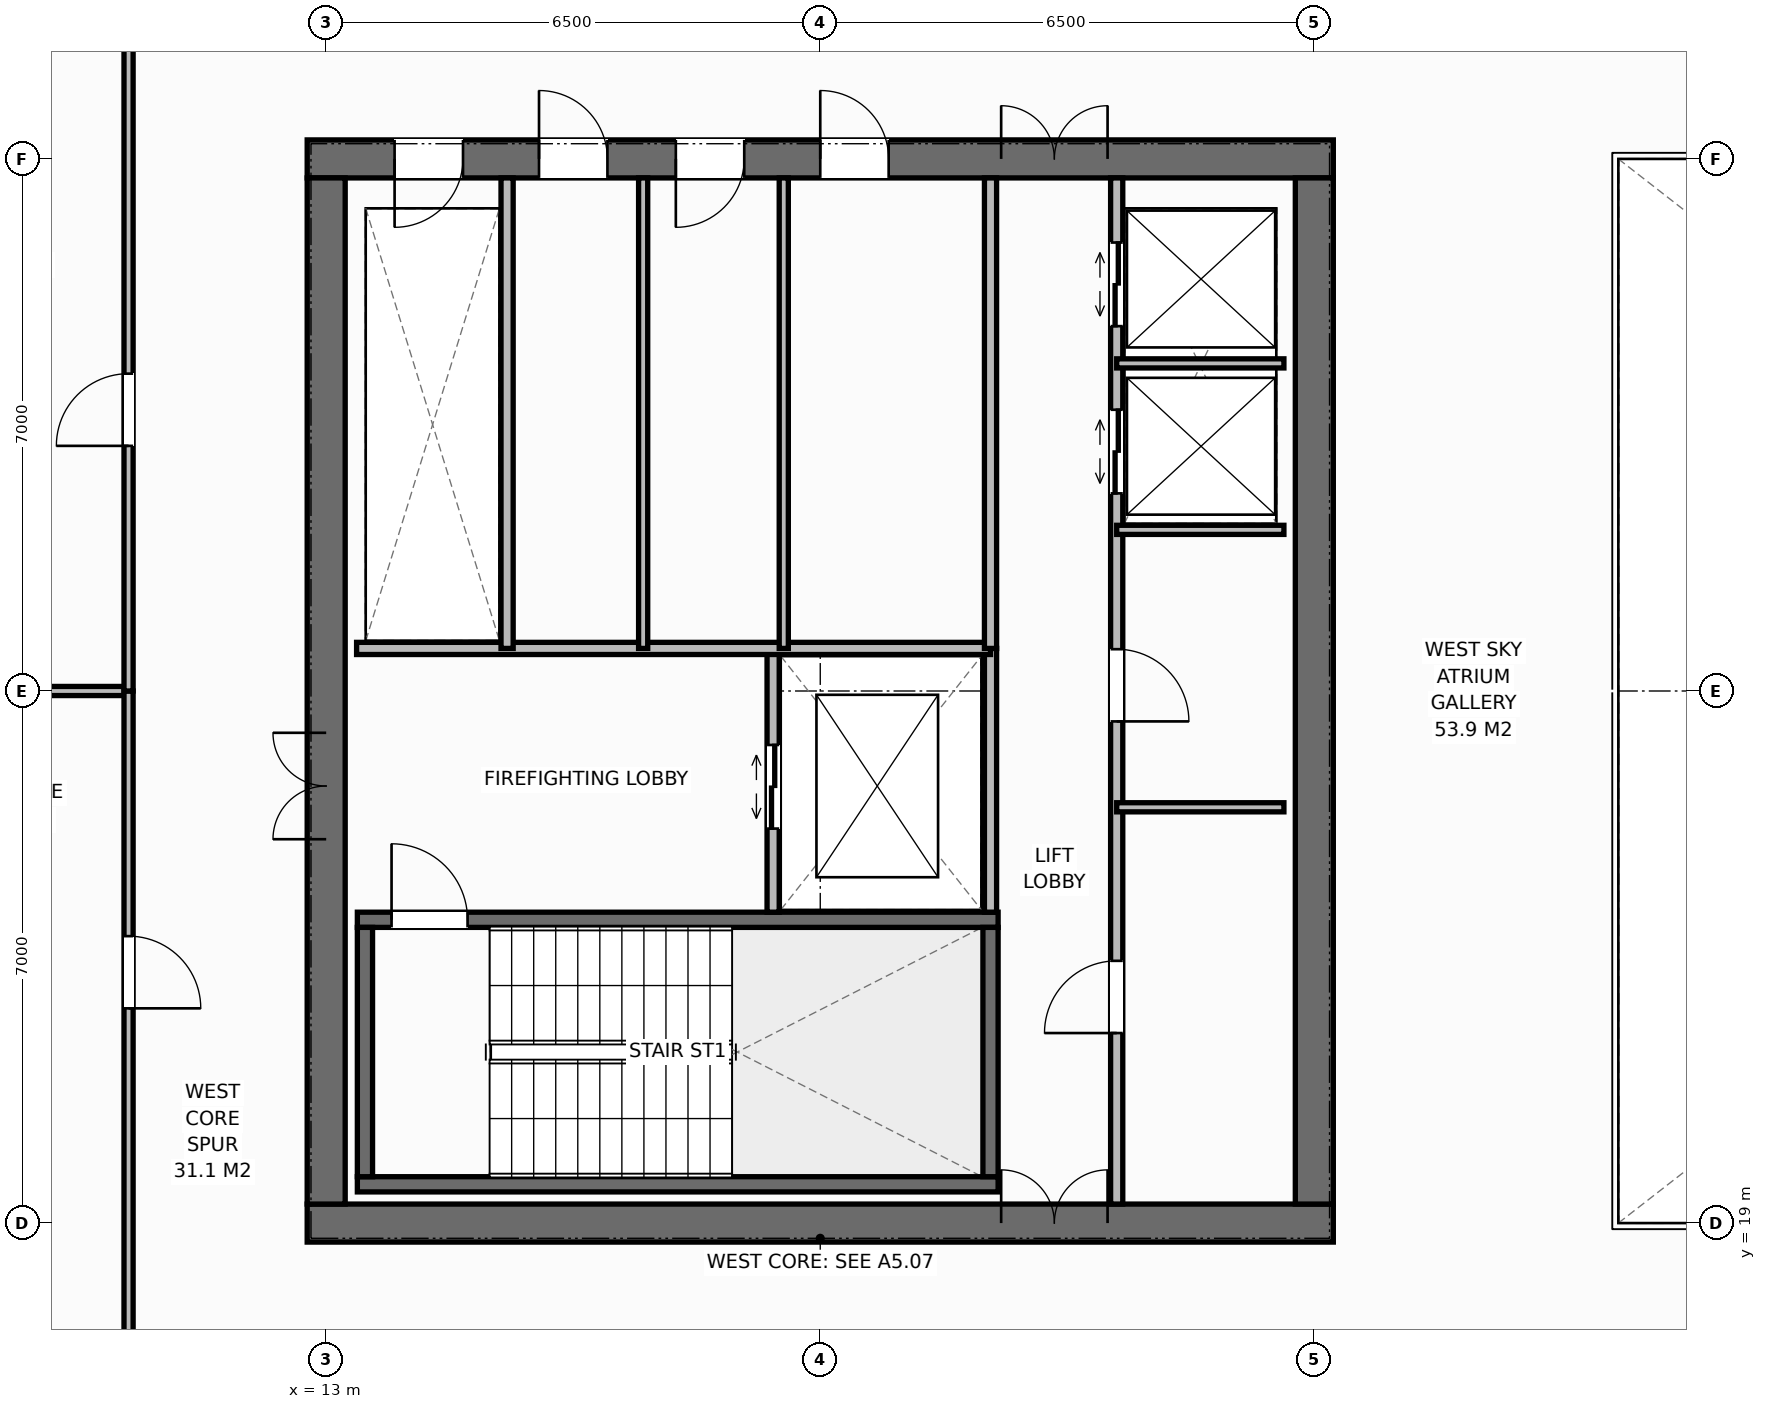
"""IFC4 building model, lengths in metres.
Left out: names, types, materials, properties, quantities, classifications, styles, units other than length and angle.
Written with IfcOpenShell. Run it as: python <this file> out.ifc"""

import sys

from ifc_helpers import new_model, si_unit, direction, frame, frame_2d, origin, place, context, subcontext, project, spatial, rectangle, extrude, element, fill, save


model = new_model("IFC4")
c1 = context("Model", 3, precision=1e-05, world=origin(), true_north=direction((0.0, 1.0)))
c2 = subcontext(c1, "Body", "Model", "MODEL_VIEW")
j1 = project(units=[si_unit("LENGTHUNIT", "METRE"), si_unit("PLANEANGLEUNIT", "RADIAN")], contexts=[c1])
p1 = place(None, origin())
s1 = spatial("IfcSite", under=j1, at=p1, CompositionType="ELEMENT")
p2 = place(p1, origin())
s2 = spatial("IfcBuilding", under=s1, at=p2, CompositionType="ELEMENT")
p3 = place(p2, frame((0.0, 0.0, 282.4)))
s3 = spatial("IfcBuildingStorey", under=s2, at=p3, CompositionType="ELEMENT", Elevation=282.4)
p4 = place(p3, frame((12.75, 19.0, 0.0), z_axis=(0.0, 0.0, 1.0), x_axis=(1.0, 0.0, 0.0)))
e1 = element("IfcWall", 1, at=p4, inside=s3, PredefinedType="SHEAR", context=c2, shape_type="SweptSolid", body=[
    extrude(rectangle(XDim=13.5, YDim=0.5, at=frame_2d((6.75, 0.0))), origin(), (0.0, 0.0, 1.0), 4.0),
])
p5 = place(p4, frame((9.13, 0.0, 0.0)))
e2 = element("IfcOpeningElement", 2, at=p5, cuts=e1, PredefinedType="OPENING", context=c2, shape_type="SweptSolid", body=[
    extrude(rectangle(XDim=1.4, YDim=2.2, at=frame_2d((0.7, 1.1))), frame((0.0, 0.26, 0.0), z_axis=(0.0, -1.0, 0.0), x_axis=(1.0, 0.0, 0.0)), (0.0, 0.0, 1.0), 0.52),
])
p6 = place(p3, frame((12.75, 33.0, 0.0), z_axis=(0.0, 0.0, 1.0), x_axis=(1.0, 0.0, 0.0)))
e3 = element("IfcWall", 3, at=p6, inside=s3, PredefinedType="SHEAR", context=c2, shape_type="SweptSolid", body=[
    extrude(rectangle(XDim=13.5, YDim=0.5, at=frame_2d((6.75, 0.0))), origin(), (0.0, 0.0, 1.0), 4.0),
])
p7 = place(p6, frame((1.15, 0.0, 0.0)))
e4 = element("IfcOpeningElement", 4, at=p7, cuts=e3, PredefinedType="OPENING", context=c2, shape_type="SweptSolid", body=[
    extrude(rectangle(XDim=0.9, YDim=2.15, at=frame_2d((0.45, 1.075))), frame((0.0, 0.26, 0.0), z_axis=(0.0, -1.0, 0.0), x_axis=(1.0, 0.0, 0.0)), (0.0, 0.0, 1.0), 0.52),
])
p8 = place(p6, frame((3.05, 0.0, 0.0)))
e5 = element("IfcOpeningElement", 5, at=p8, cuts=e3, PredefinedType="OPENING", context=c2, shape_type="SweptSolid", body=[
    extrude(rectangle(XDim=0.9, YDim=2.15, at=frame_2d((0.45, 1.075))), frame((0.0, 0.26, 0.0), z_axis=(0.0, -1.0, 0.0), x_axis=(1.0, 0.0, 0.0)), (0.0, 0.0, 1.0), 0.52),
])
p9 = place(p6, frame((4.85, 0.0, 0.0)))
e6 = element("IfcOpeningElement", 6, at=p9, cuts=e3, PredefinedType="OPENING", context=c2, shape_type="SweptSolid", body=[
    extrude(rectangle(XDim=0.9, YDim=2.15, at=frame_2d((0.45, 1.075))), frame((0.0, 0.26, 0.0), z_axis=(0.0, -1.0, 0.0), x_axis=(1.0, 0.0, 0.0)), (0.0, 0.0, 1.0), 0.52),
])
p10 = place(p6, frame((6.75, 0.0, 0.0)))
e7 = element("IfcOpeningElement", 7, at=p10, cuts=e3, PredefinedType="OPENING", context=c2, shape_type="SweptSolid", body=[
    extrude(rectangle(XDim=0.9, YDim=2.15, at=frame_2d((0.45, 1.075))), frame((0.0, 0.26, 0.0), z_axis=(0.0, -1.0, 0.0), x_axis=(1.0, 0.0, 0.0)), (0.0, 0.0, 1.0), 0.52),
])
p11 = place(p6, frame((9.13, 0.0, 0.0)))
e8 = element("IfcOpeningElement", 8, at=p11, cuts=e3, PredefinedType="OPENING", context=c2, shape_type="SweptSolid", body=[
    extrude(rectangle(XDim=1.4, YDim=2.2, at=frame_2d((0.7, 1.1))), frame((0.0, 0.26, 0.0), z_axis=(0.0, -1.0, 0.0), x_axis=(1.0, 0.0, 0.0)), (0.0, 0.0, 1.0), 0.52),
])
p12 = place(p3, frame((13.0, 19.25, 0.0), z_axis=(0.0, 0.0, 1.0), x_axis=(0.0, 1.0, 0.0)))
e9 = element("IfcWall", 9, at=p12, inside=s3, PredefinedType="SHEAR", context=c2, shape_type="SweptSolid", body=[
    extrude(rectangle(XDim=13.5, YDim=0.5, at=frame_2d((6.75, 0.0))), origin(), (0.0, 0.0, 1.0), 4.0),
])
p13 = place(p12, frame((4.8, 0.0, 0.0)))
e10 = element("IfcOpeningElement", 10, at=p13, cuts=e9, PredefinedType="OPENING", context=c2, shape_type="SweptSolid", body=[
    extrude(rectangle(XDim=1.4, YDim=2.2, at=frame_2d((0.7, 1.1))), frame((0.0, 0.26, 0.0), z_axis=(0.0, -1.0, 0.0), x_axis=(1.0, 0.0, 0.0)), (0.0, 0.0, 1.0), 0.52),
])
p14 = place(p3, frame((26.0, 19.25, 0.0), z_axis=(0.0, 0.0, 1.0), x_axis=(0.0, 1.0, 0.0)))
e11 = element("IfcWall", 11, at=p14, inside=s3, PredefinedType="SHEAR", context=c2, shape_type="SweptSolid", body=[
    extrude(rectangle(XDim=13.5, YDim=0.5, at=frame_2d((6.75, 0.0))), origin(), (0.0, 0.0, 1.0), 4.0),
])
p15 = place(p3, frame((13.41, 19.51, 0.0), z_axis=(0.0, 0.0, 1.0), x_axis=(1.0, 0.0, 0.0)))
e12 = element("IfcWall", 12, at=p15, inside=s3, PredefinedType="SHEAR", context=c2, shape_type="SweptSolid", body=[
    extrude(rectangle(XDim=8.43, YDim=0.2, at=frame_2d((4.215, 0.0))), origin(), (0.0, 0.0, 1.0), 4.0),
])
p16 = place(p3, frame((13.41, 22.99, 0.0), z_axis=(0.0, 0.0, 1.0), x_axis=(1.0, 0.0, 0.0)))
e13 = element("IfcWall", 13, at=p16, inside=s3, PredefinedType="SHEAR", context=c2, shape_type="SweptSolid", body=[
    extrude(rectangle(XDim=8.43, YDim=0.2, at=frame_2d((4.215, 0.0))), origin(), (0.0, 0.0, 1.0), 4.0),
])
p17 = place(p16, frame((0.45, 0.0, 0.0)))
e14 = element("IfcOpeningElement", 14, at=p17, cuts=e13, PredefinedType="OPENING", context=c2, shape_type="SweptSolid", body=[
    extrude(rectangle(XDim=1.0, YDim=2.15, at=frame_2d((0.5, 1.075))), frame((0.0, 0.11, 0.0), z_axis=(0.0, -1.0, 0.0), x_axis=(1.0, 0.0, 0.0)), (0.0, 0.0, 1.0), 0.22),
])
for number, where, z_axis, x_axis in (
    (15, (13.51, 19.61, 0.0), (0.0, 0.0, 1.0), (0.0, 1.0, 0.0)),
    (16, (21.74, 19.61, 0.0), (0.0, 0.0, 1.0), (0.0, 1.0, 0.0)),
):
    element("IfcWall", number, at=place(p3, frame(where, z_axis=z_axis, x_axis=x_axis)), inside=s3, PredefinedType="SHEAR", context=c2, shape_type="SweptSolid", body=[
        extrude(rectangle(XDim=3.28, YDim=0.2, at=frame_2d((1.64, 0.0))), origin(), (0.0, 0.0, 1.0), 4.0),
    ])
p18 = place(p3, frame((21.74, 23.09, 0.0), z_axis=(0.0, 0.0, 1.0), x_axis=(0.0, 1.0, 0.0)))
e17 = element("IfcWall", 17, at=p18, inside=s3, PredefinedType="STANDARD", context=c2, shape_type="SweptSolid", body=[
    extrude(rectangle(XDim=3.47, YDim=0.16, at=frame_2d((1.735, 0.0))), origin(), (0.0, 0.0, 1.0), 3.788),
])
p19 = place(p3, frame((18.88, 23.09, 0.0), z_axis=(0.0, 0.0, 1.0), x_axis=(0.0, 1.0, 0.0)))
e18 = element("IfcWall", 18, at=p19, inside=s3, PredefinedType="STANDARD", context=c2, shape_type="SweptSolid", body=[
    extrude(rectangle(XDim=3.47, YDim=0.16, at=frame_2d((1.735, 0.0))), origin(), (0.0, 0.0, 1.0), 3.788),
])
p20 = place(p19, frame((1.1, 0.0, 0.0)))
e19 = element("IfcOpeningElement", 19, at=p20, cuts=e18, PredefinedType="OPENING", context=c2, shape_type="SweptSolid", body=[
    extrude(rectangle(XDim=1.1, YDim=2.2, at=frame_2d((0.55, 1.1))), frame((0.0, 0.09, 0.0), z_axis=(0.0, -1.0, 0.0), x_axis=(1.0, 0.0, 0.0)), (0.0, 0.0, 1.0), 0.18),
])
p21 = place(p3, frame((13.4, 26.56, 0.0), z_axis=(0.0, 0.0, 1.0), x_axis=(1.0, 0.0, 0.0)))
e20 = element("IfcWall", 20, at=p21, inside=s3, PredefinedType="STANDARD", context=c2, shape_type="SweptSolid", body=[
    extrude(rectangle(XDim=8.34, YDim=0.16, at=frame_2d((4.17, 0.0))), origin(), (0.0, 0.0, 1.0), 3.788),
])
p22 = place(p3, frame((15.38, 26.56, 0.0), z_axis=(0.0, 0.0, 1.0), x_axis=(0.0, 1.0, 0.0)))
e21 = element("IfcWall", 21, at=p22, inside=s3, PredefinedType="STANDARD", context=c2, shape_type="SweptSolid", body=[
    extrude(rectangle(XDim=6.19, YDim=0.16, at=frame_2d((3.095, 0.0))), origin(), (0.0, 0.0, 1.0), 3.788),
])
for number, where, z_axis, x_axis in (
    (22, (17.17, 26.56, 0.0), (0.0, 0.0, 1.0), (0.0, 1.0, 0.0)),
    (23, (19.02, 26.56, 0.0), (0.0, 0.0, 1.0), (0.0, 1.0, 0.0)),
):
    element("IfcWall", number, at=place(p3, frame(where, z_axis=z_axis, x_axis=x_axis)), inside=s3, PredefinedType="PARTITIONING", context=c2, shape_type="SweptSolid", body=[
        extrude(rectangle(XDim=6.19, YDim=0.12, at=frame_2d((3.095, 0.0))), origin(), (0.0, 0.0, 1.0), 3.788),
    ])
p23 = place(p3, frame((21.74, 26.56, 0.0), z_axis=(0.0, 0.0, 1.0), x_axis=(0.0, 1.0, 0.0)))
e24 = element("IfcWall", 24, at=p23, inside=s3, PredefinedType="STANDARD", context=c2, shape_type="SweptSolid", body=[
    extrude(rectangle(XDim=6.19, YDim=0.16, at=frame_2d((3.095, 0.0))), origin(), (0.0, 0.0, 1.0), 3.788),
])
p24 = place(p3, frame((23.4, 19.25, 0.0), z_axis=(0.0, 0.0, 1.0), x_axis=(0.0, 1.0, 0.0)))
e25 = element("IfcWall", 25, at=p24, inside=s3, PredefinedType="STANDARD", context=c2, shape_type="SweptSolid", body=[
    extrude(rectangle(XDim=13.5, YDim=0.16, at=frame_2d((6.75, 0.0))), origin(), (0.0, 0.0, 1.0), 3.788),
])
p25 = place(p24, frame((2.25, 0.0, 0.0)))
e26 = element("IfcOpeningElement", 26, at=p25, cuts=e25, PredefinedType="OPENING", context=c2, shape_type="SweptSolid", body=[
    extrude(rectangle(XDim=0.95, YDim=2.15, at=frame_2d((0.475, 1.075))), frame((0.0, 0.09, 0.0), z_axis=(0.0, -1.0, 0.0), x_axis=(1.0, 0.0, 0.0)), (0.0, 0.0, 1.0), 0.18),
])
p26 = place(p24, frame((6.35, 0.0, 0.0)))
e27 = element("IfcOpeningElement", 27, at=p26, cuts=e25, PredefinedType="OPENING", context=c2, shape_type="SweptSolid", body=[
    extrude(rectangle(XDim=0.95, YDim=2.15, at=frame_2d((0.475, 1.075))), frame((0.0, 0.09, 0.0), z_axis=(0.0, -1.0, 0.0), x_axis=(1.0, 0.0, 0.0)), (0.0, 0.0, 1.0), 0.18),
])
p27 = place(p24, frame((9.35, 0.0, 0.0)))
e28 = element("IfcOpeningElement", 28, at=p27, cuts=e25, PredefinedType="OPENING", context=c2, shape_type="SweptSolid", body=[
    extrude(rectangle(XDim=1.1, YDim=2.2, at=frame_2d((0.55, 1.1))), frame((0.0, 0.09, 0.0), z_axis=(0.0, -1.0, 0.0), x_axis=(1.0, 0.0, 0.0)), (0.0, 0.0, 1.0), 0.18),
])
p28 = place(p24, frame((11.55, 0.0, 0.0)))
e29 = element("IfcOpeningElement", 29, at=p28, cuts=e25, PredefinedType="OPENING", context=c2, shape_type="SweptSolid", body=[
    extrude(rectangle(XDim=1.1, YDim=2.2, at=frame_2d((0.55, 1.1))), frame((0.0, 0.09, 0.0), z_axis=(0.0, -1.0, 0.0), x_axis=(1.0, 0.0, 0.0)), (0.0, 0.0, 1.0), 0.18),
])
for number, where, z_axis, x_axis in (
    (30, (23.4, 24.47, 0.0), (0.0, 0.0, 1.0), (1.0, 0.0, 0.0)),
    (31, (23.4, 28.12, 0.0), (0.0, 0.0, 1.0), (1.0, 0.0, 0.0)),
    (32, (23.4, 30.31, 0.0), (0.0, 0.0, 1.0), (1.0, 0.0, 0.0)),
):
    element("IfcWall", number, at=place(p3, frame(where, z_axis=z_axis, x_axis=x_axis)), inside=s3, PredefinedType="PARTITIONING", context=c2, shape_type="SweptSolid", body=[
        extrude(rectangle(XDim=2.2, YDim=0.12, at=frame_2d((1.1, 0.0))), origin(), (0.0, 0.0, 1.0), 3.788),
    ])
p29 = place(p3, frame((7.22, 26.0, 0.0), z_axis=(0.0, 0.0, 1.0), x_axis=(1.0, 0.0, 0.0)))
e33 = element("IfcWall", 33, at=p29, inside=s3, PredefinedType="PARTITIONING", context=c2, shape_type="SweptSolid", body=[
    extrude(rectangle(XDim=3.18, YDim=0.12, at=frame_2d((1.59, 0.0))), origin(), (0.0, 0.0, 1.0), 3.788),
])
p30 = place(p3, frame((10.4, 16.5, 0.0), z_axis=(0.0, 0.0, 1.0), x_axis=(0.0, 1.0, 0.0)))
e34 = element("IfcWall", 34, at=p30, inside=s3, PredefinedType="PARTITIONING", context=c2, shape_type="SweptSolid", body=[
    extrude(rectangle(XDim=9.5, YDim=0.12, at=frame_2d((4.75, 0.0))), origin(), (0.0, 0.0, 1.0), 3.788),
])
p31 = place(p30, frame((5.325, 0.0, 0.0)))
e35 = element("IfcOpeningElement", 35, at=p31, cuts=e34, PredefinedType="OPENING", context=c2, shape_type="SweptSolid", body=[
    extrude(rectangle(XDim=0.95, YDim=2.15, at=frame_2d((0.475, 1.075))), frame((0.0, 0.07, 0.0), z_axis=(0.0, -1.0, 0.0), x_axis=(1.0, 0.0, 0.0)), (0.0, 0.0, 1.0), 0.14),
])
p32 = place(p3, frame((10.4, 26.0, 0.0), z_axis=(0.0, 0.0, 1.0), x_axis=(0.0, 1.0, 0.0)))
e36 = element("IfcWall", 36, at=p32, inside=s3, PredefinedType="PARTITIONING", context=c2, shape_type="SweptSolid", body=[
    extrude(rectangle(XDim=9.5, YDim=0.12, at=frame_2d((4.75, 0.0))), origin(), (0.0, 0.0, 1.0), 3.788),
])
p33 = place(p32, frame((3.225, 0.0, 0.0)))
e37 = element("IfcOpeningElement", 37, at=p33, cuts=e36, PredefinedType="OPENING", context=c2, shape_type="SweptSolid", body=[
    extrude(rectangle(XDim=0.95, YDim=2.15, at=frame_2d((0.475, 1.075))), frame((0.0, 0.07, 0.0), z_axis=(0.0, -1.0, 0.0), x_axis=(1.0, 0.0, 0.0)), (0.0, 0.0, 1.0), 0.14),
])
p34 = place(p17, origin())
e38 = element("IfcDoor", 38, at=p34, inside=s3, OperationType="SINGLE_SWING_LEFT", PredefinedType="DOOR", context=c2, shape_type="SweptSolid", body=[
    extrude(rectangle(XDim=1.0, YDim=2.15, at=frame_2d((0.5, 1.075))), frame((0.0, 0.025, 0.0), z_axis=(0.0, -1.0, 0.0), x_axis=(1.0, 0.0, 0.0)), (0.0, 0.0, 1.0), 0.05),
])
fill(e14, e38)
p35 = place(p13, origin())
e39 = element("IfcDoor", 39, at=p35, inside=s3, OperationType="DOUBLE_DOOR_SINGLE_SWING", PredefinedType="DOOR", context=c2, shape_type="SweptSolid", body=[
    extrude(rectangle(XDim=1.4, YDim=2.2, at=frame_2d((0.7, 1.1))), frame((0.0, 0.025, 0.0), z_axis=(0.0, -1.0, 0.0), x_axis=(1.0, 0.0, 0.0)), (0.0, 0.0, 1.0), 0.05),
])
fill(e10, e39)
p36 = place(p20, origin())
e40 = element("IfcDoor", 40, at=p36, inside=s3, OperationType="DOUBLE_DOOR_SLIDING", PredefinedType="DOOR", context=c2, shape_type="SweptSolid", body=[
    extrude(rectangle(XDim=1.1, YDim=2.2, at=frame_2d((0.55, 1.1))), frame((0.0, 0.025, 0.0), z_axis=(0.0, -1.0, 0.0), x_axis=(1.0, 0.0, 0.0)), (0.0, 0.0, 1.0), 0.05),
])
fill(e19, e40)
p37 = place(p7, origin())
e41 = element("IfcDoor", 41, at=p37, inside=s3, OperationType="SINGLE_SWING_RIGHT", PredefinedType="DOOR", context=c2, shape_type="SweptSolid", body=[
    extrude(rectangle(XDim=0.9, YDim=2.15, at=frame_2d((0.45, 1.075))), frame((0.0, -0.025, 0.0), z_axis=(0.0, -1.0, 0.0), x_axis=(1.0, 0.0, 0.0)), (0.0, 0.0, 1.0), 0.05),
])
fill(e4, e41)
p38 = place(p8, origin())
e42 = element("IfcDoor", 42, at=p38, inside=s3, OperationType="SINGLE_SWING_LEFT", PredefinedType="DOOR", context=c2, shape_type="SweptSolid", body=[
    extrude(rectangle(XDim=0.9, YDim=2.15, at=frame_2d((0.45, 1.075))), frame((0.0, -0.025, 0.0), z_axis=(0.0, -1.0, 0.0), x_axis=(1.0, 0.0, 0.0)), (0.0, 0.0, 1.0), 0.05),
])
fill(e5, e42)
p39 = place(p9, origin())
e43 = element("IfcDoor", 43, at=p39, inside=s3, OperationType="SINGLE_SWING_RIGHT", PredefinedType="DOOR", context=c2, shape_type="SweptSolid", body=[
    extrude(rectangle(XDim=0.9, YDim=2.15, at=frame_2d((0.45, 1.075))), frame((0.0, -0.025, 0.0), z_axis=(0.0, -1.0, 0.0), x_axis=(1.0, 0.0, 0.0)), (0.0, 0.0, 1.0), 0.05),
])
fill(e6, e43)
p40 = place(p10, origin())
e44 = element("IfcDoor", 44, at=p40, inside=s3, OperationType="SINGLE_SWING_LEFT", PredefinedType="DOOR", context=c2, shape_type="SweptSolid", body=[
    extrude(rectangle(XDim=0.9, YDim=2.15, at=frame_2d((0.45, 1.075))), frame((0.0, -0.025, 0.0), z_axis=(0.0, -1.0, 0.0), x_axis=(1.0, 0.0, 0.0)), (0.0, 0.0, 1.0), 0.05),
])
fill(e7, e44)
p41 = place(p5, origin())
e45 = element("IfcDoor", 45, at=p41, inside=s3, OperationType="DOUBLE_DOOR_SINGLE_SWING", PredefinedType="DOOR", context=c2, shape_type="SweptSolid", body=[
    extrude(rectangle(XDim=1.4, YDim=2.2, at=frame_2d((0.7, 1.1))), frame((0.0, 0.075, 0.0), z_axis=(0.0, -1.0, 0.0), x_axis=(1.0, 0.0, 0.0)), (0.0, 0.0, 1.0), 0.05),
])
fill(e2, e45)
p42 = place(p11, origin())
e46 = element("IfcDoor", 46, at=p42, inside=s3, OperationType="DOUBLE_DOOR_SINGLE_SWING", PredefinedType="DOOR", context=c2, shape_type="SweptSolid", body=[
    extrude(rectangle(XDim=1.4, YDim=2.2, at=frame_2d((0.7, 1.1))), frame((0.0, -0.025, 0.0), z_axis=(0.0, -1.0, 0.0), x_axis=(1.0, 0.0, 0.0)), (0.0, 0.0, 1.0), 0.05),
])
fill(e8, e46)
p43 = place(p25, origin())
e47 = element("IfcDoor", 47, at=p43, inside=s3, OperationType="SINGLE_SWING_LEFT", PredefinedType="DOOR", context=c2, shape_type="SweptSolid", body=[
    extrude(rectangle(XDim=0.95, YDim=2.15, at=frame_2d((0.475, 1.075))), frame((0.0, 0.025, 0.0), z_axis=(0.0, -1.0, 0.0), x_axis=(1.0, 0.0, 0.0)), (0.0, 0.0, 1.0), 0.05),
])
fill(e26, e47)
p44 = place(p26, origin())
e48 = element("IfcDoor", 48, at=p44, inside=s3, OperationType="SINGLE_SWING_RIGHT", PredefinedType="DOOR", context=c2, shape_type="SweptSolid", body=[
    extrude(rectangle(XDim=0.95, YDim=2.15, at=frame_2d((0.475, 1.075))), frame((0.0, 0.025, 0.0), z_axis=(0.0, -1.0, 0.0), x_axis=(1.0, 0.0, 0.0)), (0.0, 0.0, 1.0), 0.05),
])
fill(e27, e48)
p45 = place(p27, origin())
e49 = element("IfcDoor", 49, at=p45, inside=s3, OperationType="DOUBLE_DOOR_SLIDING", PredefinedType="DOOR", context=c2, shape_type="SweptSolid", body=[
    extrude(rectangle(XDim=1.1, YDim=2.2, at=frame_2d((0.55, 1.1))), frame((0.0, 0.025, 0.0), z_axis=(0.0, -1.0, 0.0), x_axis=(1.0, 0.0, 0.0)), (0.0, 0.0, 1.0), 0.05),
])
fill(e28, e49)
p46 = place(p28, origin())
e50 = element("IfcDoor", 50, at=p46, inside=s3, OperationType="DOUBLE_DOOR_SLIDING", PredefinedType="DOOR", context=c2, shape_type="SweptSolid", body=[
    extrude(rectangle(XDim=1.1, YDim=2.2, at=frame_2d((0.55, 1.1))), frame((0.0, 0.025, 0.0), z_axis=(0.0, -1.0, 0.0), x_axis=(1.0, 0.0, 0.0)), (0.0, 0.0, 1.0), 0.05),
])
fill(e29, e50)
p47 = place(p31, origin())
e51 = element("IfcDoor", 51, at=p47, inside=s3, OperationType="SINGLE_SWING_RIGHT", PredefinedType="DOOR", context=c2, shape_type="SweptSolid", body=[
    extrude(rectangle(XDim=0.95, YDim=2.15, at=frame_2d((0.475, 1.075))), frame((0.0, 0.025, 0.0), z_axis=(0.0, -1.0, 0.0), x_axis=(1.0, 0.0, 0.0)), (0.0, 0.0, 1.0), 0.05),
])
fill(e35, e51)
p48 = place(p33, origin())
e52 = element("IfcDoor", 52, at=p48, inside=s3, OperationType="SINGLE_SWING_LEFT", PredefinedType="DOOR", context=c2, shape_type="SweptSolid", body=[
    extrude(rectangle(XDim=0.95, YDim=2.15, at=frame_2d((0.475, 1.075))), frame((0.0, 0.025, 0.0), z_axis=(0.0, -1.0, 0.0), x_axis=(1.0, 0.0, 0.0)), (0.0, 0.0, 1.0), 0.05),
])
fill(e37, e52)
save(model, sys.argv[1])
